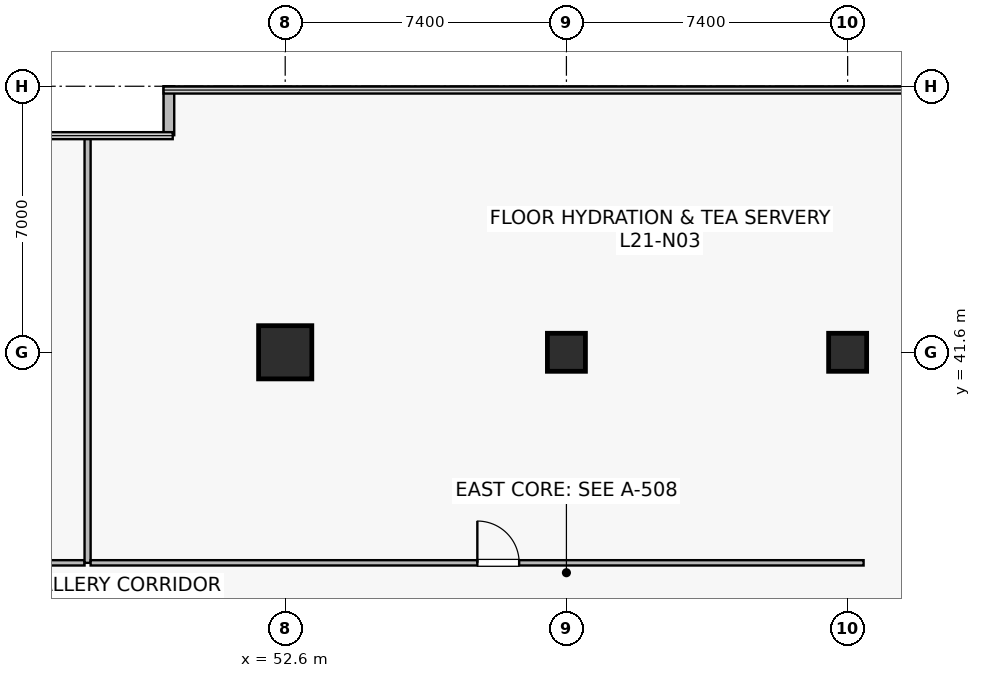
"""IFC4 building model, lengths in metres.
Left out: names, types, materials, properties, quantities, classifications, styles, units other than length and angle.
Written with IfcOpenShell. Run it as: python <this file> out.ifc"""

import sys

from ifc_helpers import new_model, si_unit, direction, frame, frame_2d, origin, origin_2d, place, context, subcontext, project, spatial, rectangle, extrude, source, transform, mapped, element, fill, save


model = new_model("IFC4")
c1 = context("Model", 3, precision=1e-05, world=origin(), true_north=direction((0.0, 1.0)))
c2 = subcontext(c1, "Body", "Model", "MODEL_VIEW")
j1 = project(units=[si_unit("LENGTHUNIT", "METRE"), si_unit("PLANEANGLEUNIT", "RADIAN")], contexts=[c1])
p1 = place(None, origin())
s1 = spatial("IfcSite", under=j1, at=p1, CompositionType="ELEMENT")
p2 = place(p1, origin())
s2 = spatial("IfcBuilding", under=s1, at=p2, CompositionType="ELEMENT")
p3 = place(p2, frame((0.0, 0.0, 86.7)))
s3 = spatial("IfcBuildingStorey", under=s2, at=p3, CompositionType="ELEMENT", Elevation=86.7)
m1 = source(origin(), c2, "Body", "SweptSolid", [
    extrude(rectangle(XDim=1.4, YDim=1.4, at=origin_2d()), origin(), (0.0, 0.0, 1.0), 4.1),
])
p4 = place(p3, frame((52.6, 41.6, 0.0), z_axis=(0.0, 0.0, 1.0), x_axis=(1.0, 0.0, 0.0)))
e1 = element("IfcColumn", 1, at=p4, inside=s3, PredefinedType="COLUMN", context=c2, shape_type="MappedRepresentation", body=[
    mapped(m1, transform((0.0, 0.0, 0.0), scale=1.0)),
])
m2 = source(origin(), c2, "Body", "SweptSolid", [
    extrude(rectangle(XDim=1.0, YDim=1.0, at=origin_2d()), origin(), (0.0, 0.0, 1.0), 4.1),
])
for number, where, z_axis, x_axis in (
    (2, (60.0, 41.6, 0.0), (0.0, 0.0, 1.0), (1.0, 0.0, 0.0)),
    (3, (67.4, 41.6, 0.0), (0.0, 0.0, 1.0), (1.0, 0.0, 0.0)),
):
    element("IfcColumn", number, at=place(p3, frame(where, z_axis=z_axis, x_axis=x_axis)), inside=s3, PredefinedType="COLUMN", context=c2, shape_type="MappedRepresentation", body=[
        mapped(m2, transform((0.0, 0.0, 0.0), scale=1.0)),
    ])
p5 = place(p3, frame((49.54, 48.6, 0.0), z_axis=(0.0, 0.0, 1.0), x_axis=(0.0, -1.0, 0.0)))
e4 = element("IfcWall", 4, at=p5, inside=s3, PredefinedType="STANDARD", context=c2, shape_type="SweptSolid", body=[
    extrude(rectangle(XDim=1.288, YDim=0.28, at=frame_2d((0.644, 0.0))), origin(), (0.0, 0.0, 1.0), 3.78),
])
p6 = place(p3, frame((23.68, 36.06, 0.0), z_axis=(0.0, 0.0, 1.0), x_axis=(1.0, 0.0, 0.0)))
e5 = element("IfcWall", 5, at=p6, inside=s3, PredefinedType="PARTITIONING", context=c2, shape_type="SweptSolid", body=[
    extrude(rectangle(XDim=23.64, YDim=0.14, at=frame_2d((11.82, 0.0))), origin(), (0.0, 0.0, 1.0), 3.115),
])
p7 = place(p6, frame((9.304, 0.0, 0.0)))
e6 = element("IfcOpeningElement", 6, at=p7, cuts=e5, PredefinedType="OPENING", context=c2, shape_type="SweptSolid", body=[
    extrude(rectangle(XDim=1.1, YDim=2.18, at=frame_2d((0.55, 1.09))), frame((0.0, 0.08, 0.0), z_axis=(0.0, -1.0, 0.0), x_axis=(1.0, 0.0, 0.0)), (0.0, 0.0, 1.0), 0.16),
])
p8 = place(p3, frame((47.4, 36.06, 0.0), z_axis=(0.0, 0.0, 1.0), x_axis=(0.0, 1.0, 0.0)))
e7 = element("IfcWall", 7, at=p8, inside=s3, PredefinedType="PARTITIONING", context=c2, shape_type="SweptSolid", body=[
    extrude(rectangle(XDim=11.23, YDim=0.16, at=frame_2d((5.615, 0.0))), origin(), (0.0, 0.0, 1.0), 3.015),
])
p9 = place(p3, frame((47.48, 36.06, 0.0), z_axis=(0.0, 0.0, 1.0), x_axis=(1.0, 0.0, 0.0)))
e8 = element("IfcWall", 8, at=p9, inside=s3, PredefinedType="PARTITIONING", context=c2, shape_type="SweptSolid", body=[
    extrude(rectangle(XDim=20.34, YDim=0.14, at=frame_2d((10.17, 0.0))), origin(), (0.0, 0.0, 1.0), 3.115),
])
p10 = place(p9, frame((10.176, 0.0, 0.0)))
e9 = element("IfcOpeningElement", 9, at=p10, cuts=e8, PredefinedType="OPENING", context=c2, shape_type="SweptSolid", body=[
    extrude(rectangle(XDim=1.1, YDim=2.18, at=frame_2d((0.55, 1.09))), frame((0.0, 0.08, 0.0), z_axis=(0.0, -1.0, 0.0), x_axis=(1.0, 0.0, 0.0)), (0.0, 0.0, 1.0), 0.16),
])
m3 = source(origin(), c2, "Body", "SweptSolid", [
    extrude(rectangle(XDim=1.1, YDim=2.18, at=frame_2d((0.55, 1.09))), frame((0.0, 0.025, 0.0), z_axis=(0.0, -1.0, 0.0), x_axis=(1.0, 0.0, 0.0)), (0.0, 0.0, 1.0), 0.05),
])
p11 = place(p10, origin())
e10 = element("IfcDoor", 10, at=p11, inside=s3, OperationType="SINGLE_SWING_LEFT", PredefinedType="DOOR", context=c2, shape_type="MappedRepresentation", body=[
    mapped(m3, transform((0.0, 0.0, 0.0), scale=1.0)),
])
fill(e9, e10)
save(model, sys.argv[1])
